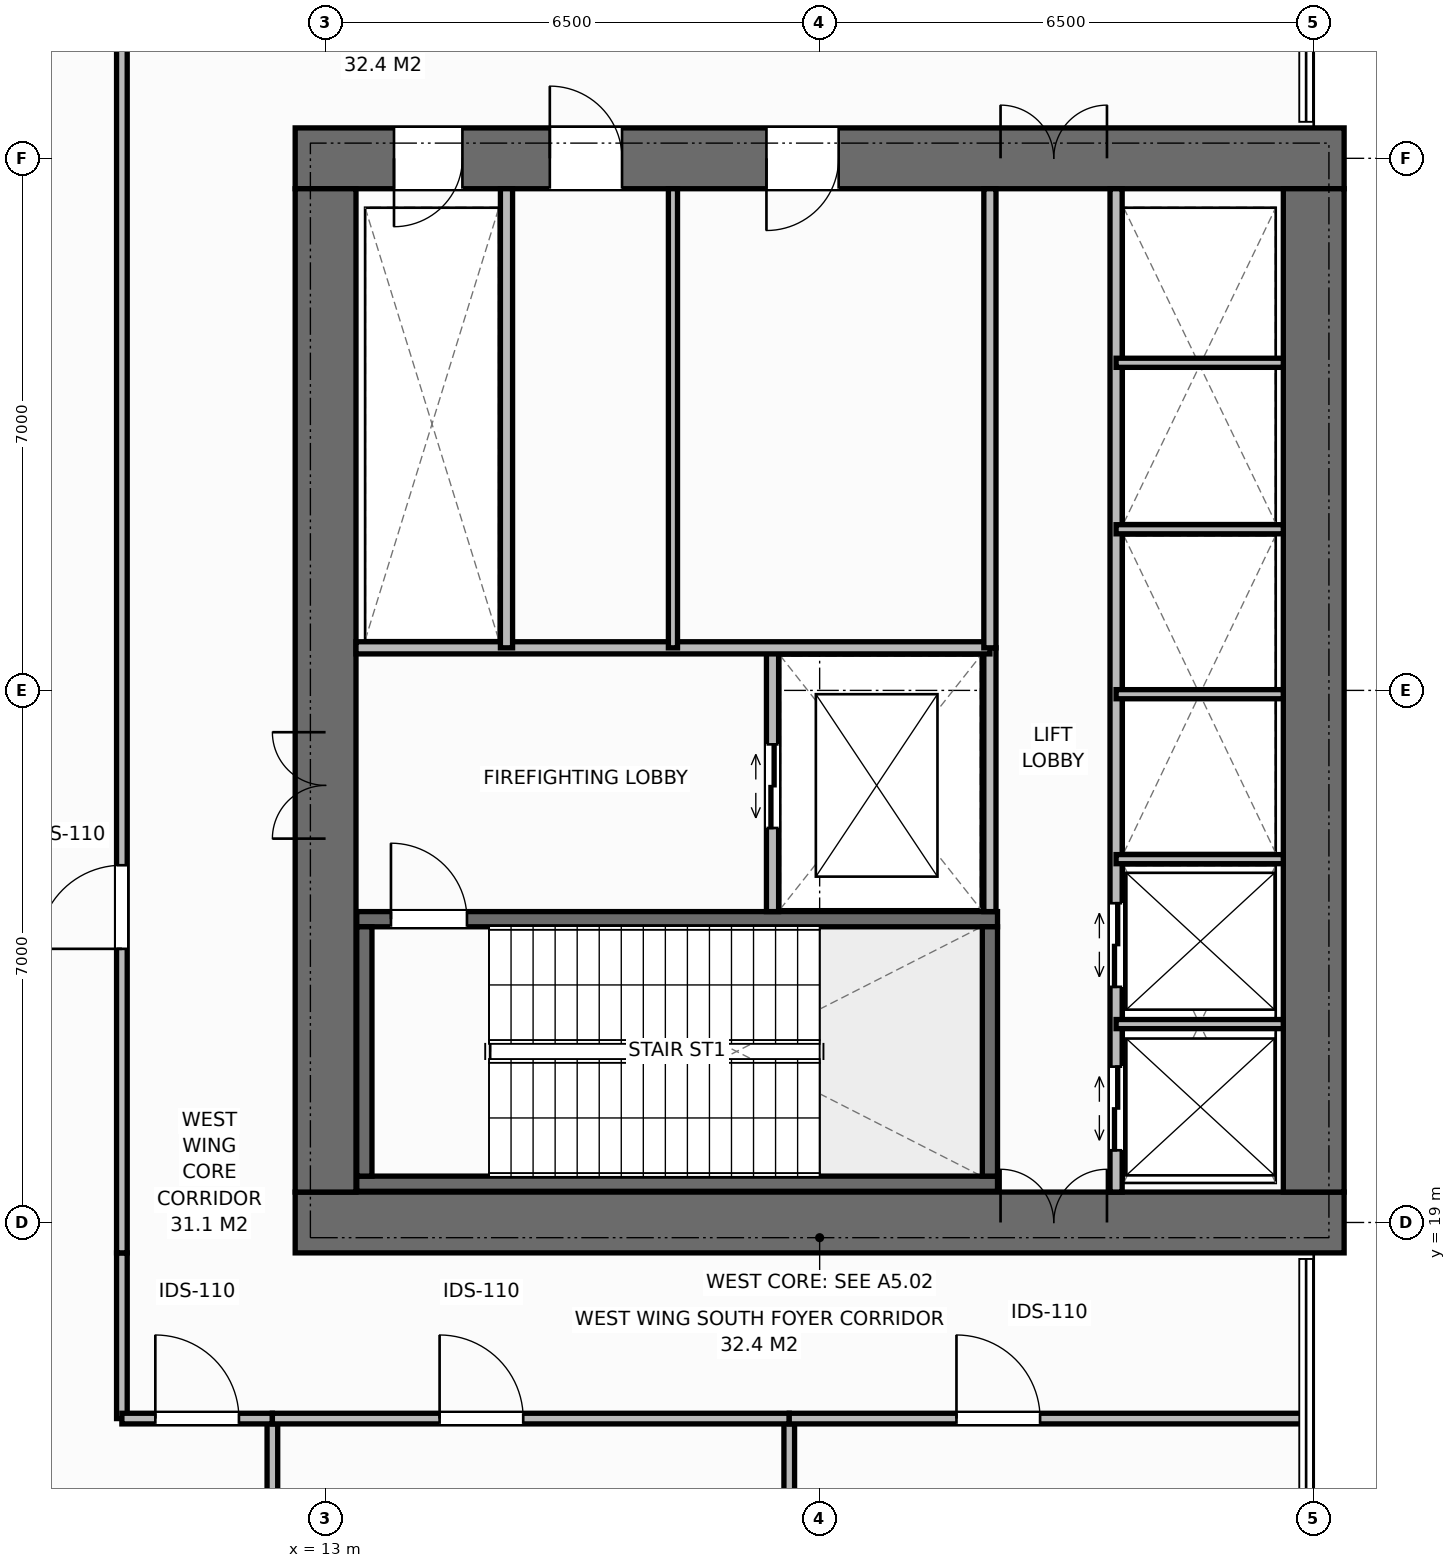
"""IFC4 building model, lengths in metres.
Left out: names, types, materials, properties, quantities, classifications, styles, units other than length and angle.
Written with IfcOpenShell. Run it as: python <this file> out.ifc"""

import sys

from ifc_helpers import new_model, si_unit, direction, frame, frame_2d, origin, place, context, subcontext, project, spatial, rectangle, extrude, element, fill, save


model = new_model("IFC4")
c1 = context("Model", 3, precision=1e-05, world=origin(), true_north=direction((0.0, 1.0)))
c2 = subcontext(c1, "Body", "Model", "MODEL_VIEW")
j1 = project(units=[si_unit("LENGTHUNIT", "METRE"), si_unit("PLANEANGLEUNIT", "RADIAN")], contexts=[c1])
p1 = place(None, origin())
s1 = spatial("IfcSite", under=j1, at=p1, CompositionType="ELEMENT")
p2 = place(p1, origin())
s2 = spatial("IfcBuilding", under=s1, at=p2, CompositionType="ELEMENT")
p3 = place(p2, frame((0.0, 0.0, 6.0)))
s3 = spatial("IfcBuildingStorey", under=s2, at=p3, CompositionType="ELEMENT", Elevation=6.0)
p4 = place(p3, frame((12.6, 19.0, 0.0), z_axis=(0.0, 0.0, 1.0), x_axis=(1.0, 0.0, 0.0)))
e1 = element("IfcWall", 1, at=p4, inside=s3, PredefinedType="SHEAR", context=c2, shape_type="SweptSolid", body=[
    extrude(rectangle(XDim=13.8, YDim=0.8, at=frame_2d((6.9, 0.0))), origin(), (0.0, 0.0, 1.0), 5.5),
])
p5 = place(p4, frame((9.28, 0.0, 0.0)))
e2 = element("IfcOpeningElement", 2, at=p5, cuts=e1, PredefinedType="OPENING", context=c2, shape_type="SweptSolid", body=[
    extrude(rectangle(XDim=1.4, YDim=2.2, at=frame_2d((0.7, 1.1))), frame((0.0, 0.41, 0.0), z_axis=(0.0, -1.0, 0.0), x_axis=(1.0, 0.0, 0.0)), (0.0, 0.0, 1.0), 0.82),
])
p6 = place(p3, frame((12.6, 33.0, 0.0), z_axis=(0.0, 0.0, 1.0), x_axis=(1.0, 0.0, 0.0)))
e3 = element("IfcWall", 3, at=p6, inside=s3, PredefinedType="SHEAR", context=c2, shape_type="SweptSolid", body=[
    extrude(rectangle(XDim=13.8, YDim=0.8, at=frame_2d((6.9, 0.0))), origin(), (0.0, 0.0, 1.0), 5.5),
])
p7 = place(p6, frame((1.3, 0.0, 0.0)))
e4 = element("IfcOpeningElement", 4, at=p7, cuts=e3, PredefinedType="OPENING", context=c2, shape_type="SweptSolid", body=[
    extrude(rectangle(XDim=0.9, YDim=2.15, at=frame_2d((0.45, 1.075))), frame((0.0, 0.41, 0.0), z_axis=(0.0, -1.0, 0.0), x_axis=(1.0, 0.0, 0.0)), (0.0, 0.0, 1.0), 0.82),
])
p8 = place(p6, frame((3.35, 0.0, 0.0)))
e5 = element("IfcOpeningElement", 5, at=p8, cuts=e3, PredefinedType="OPENING", context=c2, shape_type="SweptSolid", body=[
    extrude(rectangle(XDim=0.95, YDim=2.15, at=frame_2d((0.475, 1.075))), frame((0.0, 0.41, 0.0), z_axis=(0.0, -1.0, 0.0), x_axis=(1.0, 0.0, 0.0)), (0.0, 0.0, 1.0), 0.82),
])
p9 = place(p6, frame((6.2, 0.0, 0.0)))
e6 = element("IfcOpeningElement", 6, at=p9, cuts=e3, PredefinedType="OPENING", context=c2, shape_type="SweptSolid", body=[
    extrude(rectangle(XDim=0.95, YDim=2.15, at=frame_2d((0.475, 1.075))), frame((0.0, 0.41, 0.0), z_axis=(0.0, -1.0, 0.0), x_axis=(1.0, 0.0, 0.0)), (0.0, 0.0, 1.0), 0.82),
])
p10 = place(p6, frame((9.28, 0.0, 0.0)))
e7 = element("IfcOpeningElement", 7, at=p10, cuts=e3, PredefinedType="OPENING", context=c2, shape_type="SweptSolid", body=[
    extrude(rectangle(XDim=1.4, YDim=2.2, at=frame_2d((0.7, 1.1))), frame((0.0, 0.41, 0.0), z_axis=(0.0, -1.0, 0.0), x_axis=(1.0, 0.0, 0.0)), (0.0, 0.0, 1.0), 0.82),
])
p11 = place(p3, frame((13.0, 19.4, 0.0), z_axis=(0.0, 0.0, 1.0), x_axis=(0.0, 1.0, 0.0)))
e8 = element("IfcWall", 8, at=p11, inside=s3, PredefinedType="SHEAR", context=c2, shape_type="SweptSolid", body=[
    extrude(rectangle(XDim=13.2, YDim=0.8, at=frame_2d((6.6, 0.0))), origin(), (0.0, 0.0, 1.0), 5.5),
])
p12 = place(p11, frame((4.65, 0.0, 0.0)))
e9 = element("IfcOpeningElement", 9, at=p12, cuts=e8, PredefinedType="OPENING", context=c2, shape_type="SweptSolid", body=[
    extrude(rectangle(XDim=1.4, YDim=2.2, at=frame_2d((0.7, 1.1))), frame((0.0, 0.41, 0.0), z_axis=(0.0, -1.0, 0.0), x_axis=(1.0, 0.0, 0.0)), (0.0, 0.0, 1.0), 0.82),
])
p13 = place(p3, frame((26.0, 19.4, 0.0), z_axis=(0.0, 0.0, 1.0), x_axis=(0.0, 1.0, 0.0)))
e10 = element("IfcWall", 10, at=p13, inside=s3, PredefinedType="SHEAR", context=c2, shape_type="SweptSolid", body=[
    extrude(rectangle(XDim=13.2, YDim=0.8, at=frame_2d((6.6, 0.0))), origin(), (0.0, 0.0, 1.0), 5.5),
])
p14 = place(p3, frame((13.41, 19.51, 0.0), z_axis=(0.0, 0.0, 1.0), x_axis=(1.0, 0.0, 0.0)))
e11 = element("IfcWall", 11, at=p14, inside=s3, PredefinedType="SHEAR", context=c2, shape_type="SweptSolid", body=[
    extrude(rectangle(XDim=8.43, YDim=0.2, at=frame_2d((4.215, 0.0))), origin(), (0.0, 0.0, 1.0), 5.5),
])
p15 = place(p3, frame((13.41, 22.99, 0.0), z_axis=(0.0, 0.0, 1.0), x_axis=(1.0, 0.0, 0.0)))
e12 = element("IfcWall", 12, at=p15, inside=s3, PredefinedType="SHEAR", context=c2, shape_type="SweptSolid", body=[
    extrude(rectangle(XDim=8.43, YDim=0.2, at=frame_2d((4.215, 0.0))), origin(), (0.0, 0.0, 1.0), 5.5),
])
p16 = place(p15, frame((0.45, 0.0, 0.0)))
e13 = element("IfcOpeningElement", 13, at=p16, cuts=e12, PredefinedType="OPENING", context=c2, shape_type="SweptSolid", body=[
    extrude(rectangle(XDim=1.0, YDim=2.15, at=frame_2d((0.5, 1.075))), frame((0.0, 0.11, 0.0), z_axis=(0.0, -1.0, 0.0), x_axis=(1.0, 0.0, 0.0)), (0.0, 0.0, 1.0), 0.22),
])
for number, where, z_axis, x_axis in (
    (14, (13.51, 19.61, 0.0), (0.0, 0.0, 1.0), (0.0, 1.0, 0.0)),
    (15, (21.74, 19.61, 0.0), (0.0, 0.0, 1.0), (0.0, 1.0, 0.0)),
):
    element("IfcWall", number, at=place(p3, frame(where, z_axis=z_axis, x_axis=x_axis)), inside=s3, PredefinedType="SHEAR", context=c2, shape_type="SweptSolid", body=[
        extrude(rectangle(XDim=3.28, YDim=0.2, at=frame_2d((1.64, 0.0))), origin(), (0.0, 0.0, 1.0), 5.5),
    ])
p17 = place(p3, frame((21.74, 23.09, 0.0), z_axis=(0.0, 0.0, 1.0), x_axis=(0.0, 1.0, 0.0)))
e16 = element("IfcWall", 16, at=p17, inside=s3, PredefinedType="STANDARD", context=c2, shape_type="SweptSolid", body=[
    extrude(rectangle(XDim=3.47, YDim=0.16, at=frame_2d((1.735, 0.0))), origin(), (0.0, 0.0, 1.0), 5.22),
])
p18 = place(p3, frame((18.88, 23.09, 0.0), z_axis=(0.0, 0.0, 1.0), x_axis=(0.0, 1.0, 0.0)))
e17 = element("IfcWall", 17, at=p18, inside=s3, PredefinedType="STANDARD", context=c2, shape_type="SweptSolid", body=[
    extrude(rectangle(XDim=3.47, YDim=0.16, at=frame_2d((1.735, 0.0))), origin(), (0.0, 0.0, 1.0), 5.22),
])
p19 = place(p18, frame((1.1, 0.0, 0.0)))
e18 = element("IfcOpeningElement", 18, at=p19, cuts=e17, PredefinedType="OPENING", context=c2, shape_type="SweptSolid", body=[
    extrude(rectangle(XDim=1.1, YDim=2.2, at=frame_2d((0.55, 1.1))), frame((0.0, 0.09, 0.0), z_axis=(0.0, -1.0, 0.0), x_axis=(1.0, 0.0, 0.0)), (0.0, 0.0, 1.0), 0.18),
])
p20 = place(p3, frame((13.4, 26.56, 0.0), z_axis=(0.0, 0.0, 1.0), x_axis=(1.0, 0.0, 0.0)))
e19 = element("IfcWall", 19, at=p20, inside=s3, PredefinedType="STANDARD", context=c2, shape_type="SweptSolid", body=[
    extrude(rectangle(XDim=8.34, YDim=0.16, at=frame_2d((4.17, 0.0))), origin(), (0.0, 0.0, 1.0), 5.22),
])
p21 = place(p3, frame((15.38, 26.56, 0.0), z_axis=(0.0, 0.0, 1.0), x_axis=(0.0, 1.0, 0.0)))
e20 = element("IfcWall", 20, at=p21, inside=s3, PredefinedType="STANDARD", context=c2, shape_type="SweptSolid", body=[
    extrude(rectangle(XDim=6.04, YDim=0.16, at=frame_2d((3.02, 0.0))), origin(), (0.0, 0.0, 1.0), 5.22),
])
p22 = place(p3, frame((17.57, 26.56, 0.0), z_axis=(0.0, 0.0, 1.0), x_axis=(0.0, 1.0, 0.0)))
e21 = element("IfcWall", 21, at=p22, inside=s3, PredefinedType="PARTITIONING", context=c2, shape_type="SweptSolid", body=[
    extrude(rectangle(XDim=6.04, YDim=0.12, at=frame_2d((3.02, 0.0))), origin(), (0.0, 0.0, 1.0), 5.22),
])
p23 = place(p3, frame((21.74, 26.56, 0.0), z_axis=(0.0, 0.0, 1.0), x_axis=(0.0, 1.0, 0.0)))
e22 = element("IfcWall", 22, at=p23, inside=s3, PredefinedType="STANDARD", context=c2, shape_type="SweptSolid", body=[
    extrude(rectangle(XDim=6.04, YDim=0.16, at=frame_2d((3.02, 0.0))), origin(), (0.0, 0.0, 1.0), 5.22),
])
p24 = place(p3, frame((23.4, 19.4, 0.0), z_axis=(0.0, 0.0, 1.0), x_axis=(0.0, 1.0, 0.0)))
e23 = element("IfcWall", 23, at=p24, inside=s3, PredefinedType="STANDARD", context=c2, shape_type="SweptSolid", body=[
    extrude(rectangle(XDim=13.2, YDim=0.16, at=frame_2d((6.6, 0.0))), origin(), (0.0, 0.0, 1.0), 5.22),
])
p25 = place(p24, frame((0.55, 0.0, 0.0)))
e24 = element("IfcOpeningElement", 24, at=p25, cuts=e23, PredefinedType="OPENING", context=c2, shape_type="SweptSolid", body=[
    extrude(rectangle(XDim=1.1, YDim=2.2, at=frame_2d((0.55, 1.1))), frame((0.0, 0.09, 0.0), z_axis=(0.0, -1.0, 0.0), x_axis=(1.0, 0.0, 0.0)), (0.0, 0.0, 1.0), 0.18),
])
p26 = place(p24, frame((2.7, 0.0, 0.0)))
e25 = element("IfcOpeningElement", 25, at=p26, cuts=e23, PredefinedType="OPENING", context=c2, shape_type="SweptSolid", body=[
    extrude(rectangle(XDim=1.1, YDim=2.2, at=frame_2d((0.55, 1.1))), frame((0.0, 0.09, 0.0), z_axis=(0.0, -1.0, 0.0), x_axis=(1.0, 0.0, 0.0)), (0.0, 0.0, 1.0), 0.18),
])
for number, where, z_axis, x_axis in (
    (26, (23.4, 21.61, 0.0), (0.0, 0.0, 1.0), (1.0, 0.0, 0.0)),
    (27, (23.4, 23.78, 0.0), (0.0, 0.0, 1.0), (1.0, 0.0, 0.0)),
    (28, (23.4, 25.95, 0.0), (0.0, 0.0, 1.0), (1.0, 0.0, 0.0)),
    (29, (23.4, 28.12, 0.0), (0.0, 0.0, 1.0), (1.0, 0.0, 0.0)),
    (30, (23.4, 30.31, 0.0), (0.0, 0.0, 1.0), (1.0, 0.0, 0.0)),
):
    element("IfcWall", number, at=place(p3, frame(where, z_axis=z_axis, x_axis=x_axis)), inside=s3, PredefinedType="PARTITIONING", context=c2, shape_type="SweptSolid", body=[
        extrude(rectangle(XDim=2.2, YDim=0.12, at=frame_2d((1.1, 0.0))), origin(), (0.0, 0.0, 1.0), 5.22),
    ])
p27 = place(p3, frame((10.32, 16.42, 0.0), z_axis=(0.0, 0.0, 1.0), x_axis=(0.0, 1.0, 0.0)))
e31 = element("IfcWall", 31, at=p27, inside=s3, PredefinedType="PARTITIONING", context=c2, shape_type="SweptSolid", body=[
    extrude(rectangle(XDim=2.18, YDim=0.14, at=frame_2d((1.09, 0.0))), origin(), (0.0, 0.0, 1.0), 5.22),
])
for number, where, z_axis, x_axis in (
    (32, (12.3, 0.06, 0.0), (0.0, 0.0, 1.0), (0.0, 1.0, 0.0)),
    (33, (19.1, 0.06, 0.0), (0.0, 0.0, 1.0), (0.0, 1.0, 0.0)),
):
    element("IfcWall", number, at=place(p3, frame(where, z_axis=z_axis, x_axis=x_axis)), inside=s3, PredefinedType="PARTITIONING", context=c2, shape_type="SweptSolid", body=[
        extrude(rectangle(XDim=16.36, YDim=0.14, at=frame_2d((8.18, 0.0))), origin(), (0.0, 0.0, 1.0), 5.22),
    ])
p28 = place(p3, frame((10.32, 16.42, 0.0), z_axis=(0.0, 0.0, 1.0), x_axis=(1.0, 0.0, 0.0)))
e34 = element("IfcWall", 34, at=p28, inside=s3, PredefinedType="PARTITIONING", context=c2, shape_type="SweptSolid", body=[
    extrude(rectangle(XDim=1.98, YDim=0.14, at=frame_2d((0.99, 0.0))), origin(), (0.0, 0.0, 1.0), 5.22),
])
p29 = place(p28, frame((0.44, 0.0, 0.0)))
e35 = element("IfcOpeningElement", 35, at=p29, cuts=e34, PredefinedType="OPENING", context=c2, shape_type="SweptSolid", body=[
    extrude(rectangle(XDim=1.1, YDim=2.15, at=frame_2d((0.55, 1.075))), frame((0.0, 0.08, 0.0), z_axis=(0.0, -1.0, 0.0), x_axis=(1.0, 0.0, 0.0)), (0.0, 0.0, 1.0), 0.16),
])
p30 = place(p3, frame((12.3, 16.42, 0.0), z_axis=(0.0, 0.0, 1.0), x_axis=(1.0, 0.0, 0.0)))
e36 = element("IfcWall", 36, at=p30, inside=s3, PredefinedType="PARTITIONING", context=c2, shape_type="SweptSolid", body=[
    extrude(rectangle(XDim=6.8, YDim=0.14, at=frame_2d((3.4, 0.0))), origin(), (0.0, 0.0, 1.0), 5.22),
])
p31 = place(p30, frame((2.2, 0.0, 0.0)))
e37 = element("IfcOpeningElement", 37, at=p31, cuts=e36, PredefinedType="OPENING", context=c2, shape_type="SweptSolid", body=[
    extrude(rectangle(XDim=1.1, YDim=2.15, at=frame_2d((0.55, 1.075))), frame((0.0, 0.08, 0.0), z_axis=(0.0, -1.0, 0.0), x_axis=(1.0, 0.0, 0.0)), (0.0, 0.0, 1.0), 0.16),
])
p32 = place(p3, frame((19.1, 16.42, 0.0), z_axis=(0.0, 0.0, 1.0), x_axis=(1.0, 0.0, 0.0)))
e38 = element("IfcWall", 38, at=p32, inside=s3, PredefinedType="PARTITIONING", context=c2, shape_type="SweptSolid", body=[
    extrude(rectangle(XDim=6.82, YDim=0.14, at=frame_2d((3.41, 0.0))), origin(), (0.0, 0.0, 1.0), 5.22),
])
p33 = place(p32, frame((2.2, 0.0, 0.0)))
e39 = element("IfcOpeningElement", 39, at=p33, cuts=e38, PredefinedType="OPENING", context=c2, shape_type="SweptSolid", body=[
    extrude(rectangle(XDim=1.1, YDim=2.15, at=frame_2d((0.55, 1.075))), frame((0.0, 0.08, 0.0), z_axis=(0.0, -1.0, 0.0), x_axis=(1.0, 0.0, 0.0)), (0.0, 0.0, 1.0), 0.16),
])
p34 = place(p3, frame((10.32, 18.6, 0.0), z_axis=(0.0, 0.0, 1.0), x_axis=(0.0, 1.0, 0.0)))
e40 = element("IfcWall", 40, at=p34, inside=s3, PredefinedType="PARTITIONING", context=c2, shape_type="SweptSolid", body=[
    extrude(rectangle(XDim=16.98, YDim=0.14, at=frame_2d((8.49, 0.0))), origin(), (0.0, 0.0, 1.0), 5.22),
])
p35 = place(p34, frame((4.0, 0.0, 0.0)))
e41 = element("IfcOpeningElement", 41, at=p35, cuts=e40, PredefinedType="OPENING", context=c2, shape_type="SweptSolid", body=[
    extrude(rectangle(XDim=1.1, YDim=2.15, at=frame_2d((0.55, 1.075))), frame((0.0, 0.08, 0.0), z_axis=(0.0, -1.0, 0.0), x_axis=(1.0, 0.0, 0.0)), (0.0, 0.0, 1.0), 0.16),
])
p36 = place(p16, origin())
e42 = element("IfcDoor", 42, at=p36, inside=s3, OperationType="SINGLE_SWING_LEFT", PredefinedType="DOOR", context=c2, shape_type="SweptSolid", body=[
    extrude(rectangle(XDim=1.0, YDim=2.15, at=frame_2d((0.5, 1.075))), frame((0.0, 0.025, 0.0), z_axis=(0.0, -1.0, 0.0), x_axis=(1.0, 0.0, 0.0)), (0.0, 0.0, 1.0), 0.05),
])
fill(e13, e42)
p37 = place(p12, origin())
e43 = element("IfcDoor", 43, at=p37, inside=s3, OperationType="DOUBLE_DOOR_SINGLE_SWING", PredefinedType="DOOR", context=c2, shape_type="SweptSolid", body=[
    extrude(rectangle(XDim=1.4, YDim=2.2, at=frame_2d((0.7, 1.1))), frame((0.0, 0.025, 0.0), z_axis=(0.0, -1.0, 0.0), x_axis=(1.0, 0.0, 0.0)), (0.0, 0.0, 1.0), 0.05),
])
fill(e9, e43)
p38 = place(p19, origin())
e44 = element("IfcDoor", 44, at=p38, inside=s3, OperationType="DOUBLE_DOOR_SLIDING", PredefinedType="DOOR", context=c2, shape_type="SweptSolid", body=[
    extrude(rectangle(XDim=1.1, YDim=2.2, at=frame_2d((0.55, 1.1))), frame((0.0, 0.025, 0.0), z_axis=(0.0, -1.0, 0.0), x_axis=(1.0, 0.0, 0.0)), (0.0, 0.0, 1.0), 0.05),
])
fill(e18, e44)
p39 = place(p7, origin())
e45 = element("IfcDoor", 45, at=p39, inside=s3, OperationType="SINGLE_SWING_RIGHT", PredefinedType="DOOR", context=c2, shape_type="SweptSolid", body=[
    extrude(rectangle(XDim=0.9, YDim=2.15, at=frame_2d((0.45, 1.075))), frame((0.0, -0.075, 0.0), z_axis=(0.0, -1.0, 0.0), x_axis=(1.0, 0.0, 0.0)), (0.0, 0.0, 1.0), 0.05),
])
fill(e4, e45)
p40 = place(p8, origin())
e46 = element("IfcDoor", 46, at=p40, inside=s3, OperationType="SINGLE_SWING_LEFT", PredefinedType="DOOR", context=c2, shape_type="SweptSolid", body=[
    extrude(rectangle(XDim=0.95, YDim=2.15, at=frame_2d((0.475, 1.075))), frame((0.0, -0.075, 0.0), z_axis=(0.0, -1.0, 0.0), x_axis=(1.0, 0.0, 0.0)), (0.0, 0.0, 1.0), 0.05),
])
fill(e5, e46)
p41 = place(p9, origin())
e47 = element("IfcDoor", 47, at=p41, inside=s3, OperationType="SINGLE_SWING_RIGHT", PredefinedType="DOOR", context=c2, shape_type="SweptSolid", body=[
    extrude(rectangle(XDim=0.95, YDim=2.15, at=frame_2d((0.475, 1.075))), frame((0.0, -0.075, 0.0), z_axis=(0.0, -1.0, 0.0), x_axis=(1.0, 0.0, 0.0)), (0.0, 0.0, 1.0), 0.05),
])
fill(e6, e47)
p42 = place(p5, origin())
e48 = element("IfcDoor", 48, at=p42, inside=s3, OperationType="DOUBLE_DOOR_SINGLE_SWING", PredefinedType="DOOR", context=c2, shape_type="SweptSolid", body=[
    extrude(rectangle(XDim=1.4, YDim=2.2, at=frame_2d((0.7, 1.1))), frame((0.0, 0.125, 0.0), z_axis=(0.0, -1.0, 0.0), x_axis=(1.0, 0.0, 0.0)), (0.0, 0.0, 1.0), 0.05),
])
fill(e2, e48)
p43 = place(p10, origin())
e49 = element("IfcDoor", 49, at=p43, inside=s3, OperationType="DOUBLE_DOOR_SINGLE_SWING", PredefinedType="DOOR", context=c2, shape_type="SweptSolid", body=[
    extrude(rectangle(XDim=1.4, YDim=2.2, at=frame_2d((0.7, 1.1))), frame((0.0, -0.075, 0.0), z_axis=(0.0, -1.0, 0.0), x_axis=(1.0, 0.0, 0.0)), (0.0, 0.0, 1.0), 0.05),
])
fill(e7, e49)
p44 = place(p25, origin())
e50 = element("IfcDoor", 50, at=p44, inside=s3, OperationType="DOUBLE_DOOR_SLIDING", PredefinedType="DOOR", context=c2, shape_type="SweptSolid", body=[
    extrude(rectangle(XDim=1.1, YDim=2.2, at=frame_2d((0.55, 1.1))), frame((0.0, 0.025, 0.0), z_axis=(0.0, -1.0, 0.0), x_axis=(1.0, 0.0, 0.0)), (0.0, 0.0, 1.0), 0.05),
])
fill(e24, e50)
p45 = place(p26, origin())
e51 = element("IfcDoor", 51, at=p45, inside=s3, OperationType="DOUBLE_DOOR_SLIDING", PredefinedType="DOOR", context=c2, shape_type="SweptSolid", body=[
    extrude(rectangle(XDim=1.1, YDim=2.2, at=frame_2d((0.55, 1.1))), frame((0.0, 0.025, 0.0), z_axis=(0.0, -1.0, 0.0), x_axis=(1.0, 0.0, 0.0)), (0.0, 0.0, 1.0), 0.05),
])
fill(e25, e51)
p46 = place(p29, origin())
e52 = element("IfcDoor", 52, at=p46, inside=s3, OperationType="SINGLE_SWING_LEFT", PredefinedType="DOOR", context=c2, shape_type="SweptSolid", body=[
    extrude(rectangle(XDim=1.1, YDim=2.15, at=frame_2d((0.55, 1.075))), frame((0.0, 0.025, 0.0), z_axis=(0.0, -1.0, 0.0), x_axis=(1.0, 0.0, 0.0)), (0.0, 0.0, 1.0), 0.05),
])
fill(e35, e52)
p47 = place(p31, origin())
e53 = element("IfcDoor", 53, at=p47, inside=s3, OperationType="SINGLE_SWING_LEFT", PredefinedType="DOOR", context=c2, shape_type="SweptSolid", body=[
    extrude(rectangle(XDim=1.1, YDim=2.15, at=frame_2d((0.55, 1.075))), frame((0.0, 0.025, 0.0), z_axis=(0.0, -1.0, 0.0), x_axis=(1.0, 0.0, 0.0)), (0.0, 0.0, 1.0), 0.05),
])
fill(e37, e53)
p48 = place(p33, origin())
e54 = element("IfcDoor", 54, at=p48, inside=s3, OperationType="SINGLE_SWING_LEFT", PredefinedType="DOOR", context=c2, shape_type="SweptSolid", body=[
    extrude(rectangle(XDim=1.1, YDim=2.15, at=frame_2d((0.55, 1.075))), frame((0.0, 0.025, 0.0), z_axis=(0.0, -1.0, 0.0), x_axis=(1.0, 0.0, 0.0)), (0.0, 0.0, 1.0), 0.05),
])
fill(e39, e54)
p49 = place(p35, origin())
e55 = element("IfcDoor", 55, at=p49, inside=s3, OperationType="SINGLE_SWING_LEFT", PredefinedType="DOOR", context=c2, shape_type="SweptSolid", body=[
    extrude(rectangle(XDim=1.1, YDim=2.15, at=frame_2d((0.55, 1.075))), frame((0.0, 0.025, 0.0), z_axis=(0.0, -1.0, 0.0), x_axis=(1.0, 0.0, 0.0)), (0.0, 0.0, 1.0), 0.05),
])
fill(e41, e55)
save(model, sys.argv[1])
